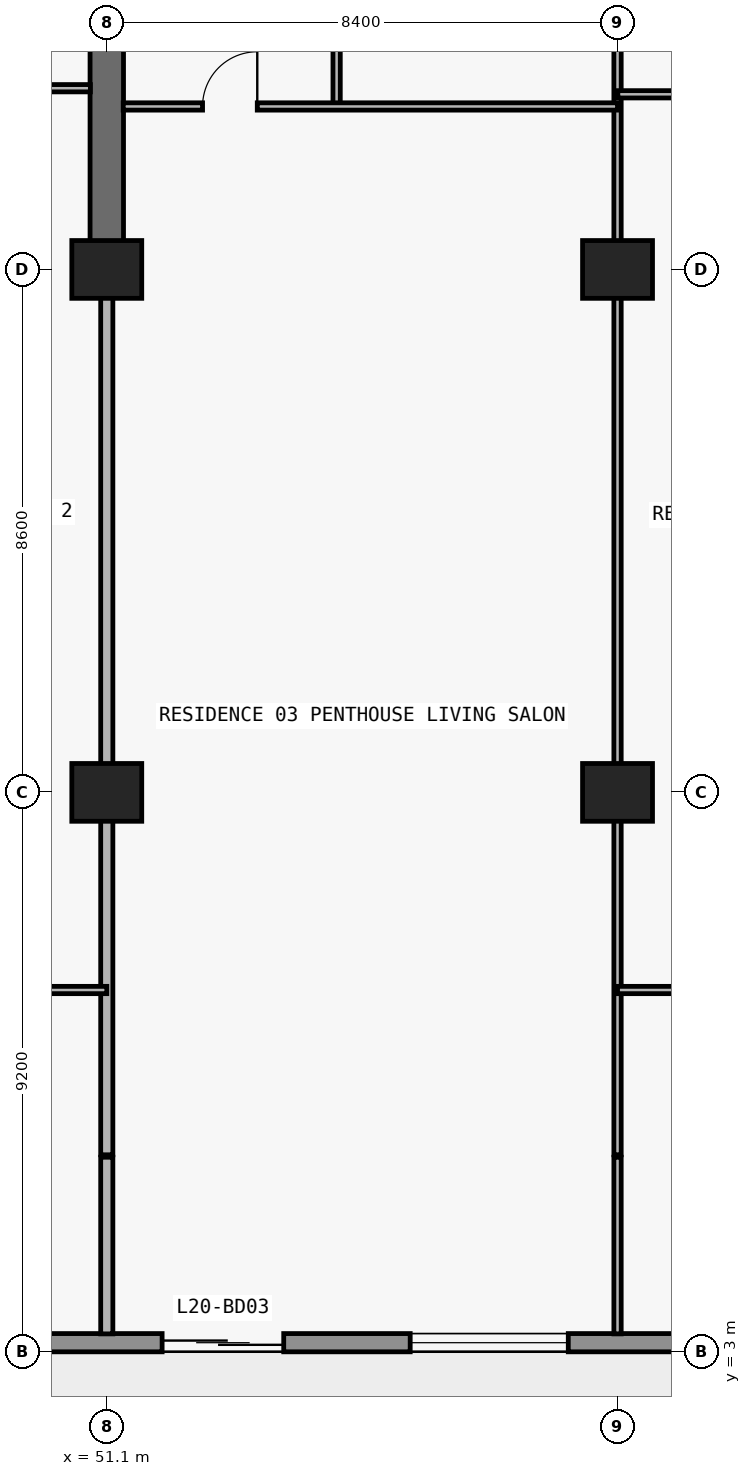
"""IFC4 building model, lengths in metres.
Left out: names, types, materials, properties, quantities, classifications, styles, units other than length and angle.
Written with IfcOpenShell. Run it as: python <this file> out.ifc"""

import sys

from ifc_helpers import new_model, si_unit, direction, frame, frame_2d, origin, origin_2d, place, context, subcontext, project, spatial, rectangle, extrude, element, fill, save


model = new_model("IFC4")
c1 = context("Model", 3, precision=1e-05, world=origin(), true_north=direction((0.0, 1.0)))
c2 = subcontext(c1, "Body", "Model", "MODEL_VIEW")
j1 = project(units=[si_unit("LENGTHUNIT", "METRE"), si_unit("PLANEANGLEUNIT", "RADIAN")], contexts=[c1])
p1 = place(None, origin())
s1 = spatial("IfcSite", under=j1, at=p1, CompositionType="ELEMENT")
p2 = place(p1, origin())
s2 = spatial("IfcBuilding", under=s1, at=p2, CompositionType="ELEMENT")
p3 = place(p2, frame((0.0, 0.0, 76.2)))
s3 = spatial("IfcBuildingStorey", under=s2, at=p3, CompositionType="ELEMENT", Elevation=76.2)
for number, where, z_axis, x_axis in (
    (1, (51.1, 12.2, 0.0), (0.0, 0.0, 1.0), (1.0, 0.0, 0.0)),
    (2, (59.5, 12.2, 0.0), (0.0, 0.0, 1.0), (1.0, 0.0, 0.0)),
    (3, (51.1, 20.8, 0.0), (0.0, 0.0, 1.0), (1.0, 0.0, 0.0)),
    (4, (59.5, 20.8, 0.0), (0.0, 0.0, 1.0), (1.0, 0.0, 0.0)),
):
    element("IfcColumn", number, at=place(p3, frame(where, z_axis=z_axis, x_axis=x_axis)), inside=s3, PredefinedType="COLUMN", context=c2, shape_type="SweptSolid", body=[
        extrude(rectangle(XDim=1.15, YDim=0.95, at=origin_2d()), origin(), (0.0, 0.0, 1.0), 3.0),
    ])
p4 = place(p3, frame((51.1, 20.8, 0.0), z_axis=(0.0, 0.0, 1.0), x_axis=(0.0, 1.0, 0.0)))
e5 = element("IfcWall", 5, at=p4, inside=s3, PredefinedType="SHEAR", context=c2, shape_type="SweptSolid", body=[
    extrude(rectangle(XDim=8.6, YDim=0.55, at=frame_2d((4.3, 0.0))), origin(), (0.0, 0.0, 1.0), 3.0),
])
p5 = place(p3, frame((72.7, 3.15, 0.0), z_axis=(0.0, 0.0, 1.0), x_axis=(-1.0, 0.0, 0.0)))
e6 = element("IfcWall", 6, at=p5, inside=s3, PredefinedType="STANDARD", context=c2, shape_type="SweptSolid", body=[
    extrude(rectangle(XDim=67.6, YDim=0.3, at=frame_2d((33.8, 0.0))), origin(), (0.0, 0.0, 1.0), 3.0),
])
p6 = place(p5, frame((59.89, 0.0, 0.0)))
e7 = element("IfcOpeningElement", 7, at=p6, cuts=e6, PredefinedType="OPENING", context=c2, shape_type="SweptSolid", body=[
    extrude(rectangle(XDim=2.0, YDim=2.3, at=frame_2d((1.0, 1.15))), frame((0.0, 0.16, 0.0), z_axis=(0.0, -1.0, 0.0), x_axis=(1.0, 0.0, 0.0)), (0.0, 0.0, 1.0), 0.32),
])
p7 = place(p5, frame((55.21, 0.0, 0.65)))
e8 = element("IfcOpeningElement", 8, at=p7, cuts=e6, PredefinedType="OPENING", context=c2, shape_type="SweptSolid", body=[
    extrude(rectangle(XDim=2.6, YDim=1.85, at=frame_2d((1.3, 0.925))), frame((0.0, 0.16, 0.0), z_axis=(0.0, -1.0, 0.0), x_axis=(1.0, 0.0, 0.0)), (0.0, 0.0, 1.0), 0.32),
])
p8 = place(p5, frame((49.1, 0.0, 0.85)))
e9 = element("IfcOpeningElement", 9, at=p8, cuts=e6, PredefinedType="OPENING", context=c2, shape_type="SweptSolid", body=[
    extrude(rectangle(XDim=2.2, YDim=1.55, at=frame_2d((1.1, 0.775))), frame((0.0, 0.16, 0.0), z_axis=(0.0, -1.0, 0.0), x_axis=(1.0, 0.0, 0.0)), (0.0, 0.0, 1.0), 0.32),
])
p9 = place(p5, frame((43.09, 0.0, 0.0)))
e10 = element("IfcOpeningElement", 10, at=p9, cuts=e6, PredefinedType="OPENING", context=c2, shape_type="SweptSolid", body=[
    extrude(rectangle(XDim=2.0, YDim=2.3, at=frame_2d((1.0, 1.15))), frame((0.0, 0.16, 0.0), z_axis=(0.0, -1.0, 0.0), x_axis=(1.0, 0.0, 0.0)), (0.0, 0.0, 1.0), 0.32),
])
p10 = place(p5, frame((38.41, 0.0, 0.65)))
e11 = element("IfcOpeningElement", 11, at=p10, cuts=e6, PredefinedType="OPENING", context=c2, shape_type="SweptSolid", body=[
    extrude(rectangle(XDim=2.6, YDim=1.85, at=frame_2d((1.3, 0.925))), frame((0.0, 0.16, 0.0), z_axis=(0.0, -1.0, 0.0), x_axis=(1.0, 0.0, 0.0)), (0.0, 0.0, 1.0), 0.32),
])
p11 = place(p5, frame((32.7, 0.0, 0.85)))
e12 = element("IfcOpeningElement", 12, at=p11, cuts=e6, PredefinedType="OPENING", context=c2, shape_type="SweptSolid", body=[
    extrude(rectangle(XDim=2.2, YDim=1.55, at=frame_2d((1.1, 0.775))), frame((0.0, 0.16, 0.0), z_axis=(0.0, -1.0, 0.0), x_axis=(1.0, 0.0, 0.0)), (0.0, 0.0, 1.0), 0.32),
])
p12 = place(p5, frame((24.7, 0.0, 0.85)))
e13 = element("IfcOpeningElement", 13, at=p12, cuts=e6, PredefinedType="OPENING", context=c2, shape_type="SweptSolid", body=[
    extrude(rectangle(XDim=2.2, YDim=1.55, at=frame_2d((1.1, 0.775))), frame((0.0, 0.16, 0.0), z_axis=(0.0, -1.0, 0.0), x_axis=(1.0, 0.0, 0.0)), (0.0, 0.0, 1.0), 0.32),
])
p13 = place(p5, frame((18.69, 0.0, 0.0)))
e14 = element("IfcOpeningElement", 14, at=p13, cuts=e6, PredefinedType="OPENING", context=c2, shape_type="SweptSolid", body=[
    extrude(rectangle(XDim=2.0, YDim=2.3, at=frame_2d((1.0, 1.15))), frame((0.0, 0.16, 0.0), z_axis=(0.0, -1.0, 0.0), x_axis=(1.0, 0.0, 0.0)), (0.0, 0.0, 1.0), 0.32),
])
p14 = place(p5, frame((14.01, 0.0, 0.65)))
e15 = element("IfcOpeningElement", 15, at=p14, cuts=e6, PredefinedType="OPENING", context=c2, shape_type="SweptSolid", body=[
    extrude(rectangle(XDim=2.6, YDim=1.85, at=frame_2d((1.3, 0.925))), frame((0.0, 0.16, 0.0), z_axis=(0.0, -1.0, 0.0), x_axis=(1.0, 0.0, 0.0)), (0.0, 0.0, 1.0), 0.32),
])
p15 = place(p5, frame((7.9, 0.0, 0.85)))
e16 = element("IfcOpeningElement", 16, at=p15, cuts=e6, PredefinedType="OPENING", context=c2, shape_type="SweptSolid", body=[
    extrude(rectangle(XDim=2.2, YDim=1.55, at=frame_2d((1.1, 0.775))), frame((0.0, 0.16, 0.0), z_axis=(0.0, -1.0, 0.0), x_axis=(1.0, 0.0, 0.0)), (0.0, 0.0, 1.0), 0.32),
])
p16 = place(p3, frame((51.1, 3.295, 0.0), z_axis=(0.0, 0.0, 1.0), x_axis=(0.0, 1.0, 0.0)))
e17 = element("IfcWall", 17, at=p16, inside=s3, PredefinedType="PARTITIONING", context=c2, shape_type="SweptSolid", body=[
    extrude(rectangle(XDim=2.905, YDim=0.2, at=frame_2d((1.453, 0.0))), origin(), (0.0, 0.0, 1.0), 3.0),
])
p17 = place(p3, frame((51.1, 6.24, 0.0), z_axis=(0.0, 0.0, 1.0), x_axis=(0.0, 1.0, 0.0)))
e18 = element("IfcWall", 18, at=p17, inside=s3, PredefinedType="PARTITIONING", context=c2, shape_type="SweptSolid", body=[
    extrude(rectangle(XDim=14.555, YDim=0.2, at=frame_2d((7.277, 0.0))), origin(), (0.0, 0.0, 1.0), 2.06),
])
p18 = place(p3, frame((54.88, 23.48, 0.0), z_axis=(0.0, 0.0, 1.0), x_axis=(0.0, 1.0, 0.0)))
e19 = element("IfcWall", 19, at=p18, inside=s3, PredefinedType="PARTITIONING", context=c2, shape_type="SweptSolid", body=[
    extrude(rectangle(XDim=4.8, YDim=0.12, at=frame_2d((2.4, 0.0))), origin(), (0.0, 0.0, 1.0), 3.0),
])
p19 = place(p18, frame((1.95, 0.0, 0.0)))
e20 = element("IfcOpeningElement", 20, at=p19, cuts=e19, PredefinedType="OPENING", context=c2, shape_type="SweptSolid", body=[
    extrude(rectangle(XDim=0.9, YDim=2.15, at=frame_2d((0.45, 1.075))), frame((0.0, 0.07, 0.0), z_axis=(0.0, -1.0, 0.0), x_axis=(1.0, 0.0, 0.0)), (0.0, 0.0, 1.0), 0.14),
])
p20 = place(p3, frame((59.5, 3.295, 0.0), z_axis=(0.0, 0.0, 1.0), x_axis=(0.0, 1.0, 0.0)))
e21 = element("IfcWall", 21, at=p20, inside=s3, PredefinedType="PARTITIONING", context=c2, shape_type="SweptSolid", body=[
    extrude(rectangle(XDim=2.905, YDim=0.12, at=frame_2d((1.453, 0.0))), origin(), (0.0, 0.0, 1.0), 3.0),
])
p21 = place(p3, frame((59.5, 6.24, 0.0), z_axis=(0.0, 0.0, 1.0), x_axis=(0.0, 1.0, 0.0)))
e22 = element("IfcWall", 22, at=p21, inside=s3, PredefinedType="PARTITIONING", context=c2, shape_type="SweptSolid", body=[
    extrude(rectangle(XDim=27.96, YDim=0.12, at=frame_2d((13.98, 0.0))), origin(), (0.0, 0.0, 1.0), 2.06),
])
p22 = place(p21, frame((19.19, 0.0, 0.0)))
e23 = element("IfcOpeningElement", 23, at=p22, cuts=e22, PredefinedType="OPENING", context=c2, shape_type="SweptSolid", body=[
    extrude(rectangle(XDim=0.9, YDim=2.01, at=frame_2d((0.45, 1.005))), frame((0.0, 0.07, 0.0), z_axis=(0.0, -1.0, 0.0), x_axis=(1.0, 0.0, 0.0)), (0.0, 0.0, 1.0), 0.14),
])
p23 = place(p3, frame((35.1, 8.95, 0.0), z_axis=(0.0, 0.0, 1.0), x_axis=(1.0, 0.0, 0.0)))
e24 = element("IfcWall", 24, at=p23, inside=s3, PredefinedType="PARTITIONING", context=c2, shape_type="SweptSolid", body=[
    extrude(rectangle(XDim=16.0, YDim=0.12, at=frame_2d((8.0, 0.0))), origin(), (0.0, 0.0, 1.0), 3.0),
])
p24 = place(p23, frame((3.35, 0.0, 0.0)))
e25 = element("IfcOpeningElement", 25, at=p24, cuts=e24, PredefinedType="OPENING", context=c2, shape_type="SweptSolid", body=[
    extrude(rectangle(XDim=0.9, YDim=2.15, at=frame_2d((0.45, 1.075))), frame((0.0, 0.07, 0.0), z_axis=(0.0, -1.0, 0.0), x_axis=(1.0, 0.0, 0.0)), (0.0, 0.0, 1.0), 0.14),
])
p25 = place(p23, frame((11.35, 0.0, 0.0)))
e26 = element("IfcOpeningElement", 26, at=p25, cuts=e24, PredefinedType="OPENING", context=c2, shape_type="SweptSolid", body=[
    extrude(rectangle(XDim=0.9, YDim=2.15, at=frame_2d((0.45, 1.075))), frame((0.0, 0.07, 0.0), z_axis=(0.0, -1.0, 0.0), x_axis=(1.0, 0.0, 0.0)), (0.0, 0.0, 1.0), 0.14),
])
p26 = place(p3, frame((59.5, 8.95, 0.0), z_axis=(0.0, 0.0, 1.0), x_axis=(1.0, 0.0, 0.0)))
e27 = element("IfcWall", 27, at=p26, inside=s3, PredefinedType="PARTITIONING", context=c2, shape_type="SweptSolid", body=[
    extrude(rectangle(XDim=8.4, YDim=0.12, at=frame_2d((4.2, 0.0))), origin(), (0.0, 0.0, 1.0), 3.0),
])
p27 = place(p26, frame((3.75, 0.0, 0.0)))
e28 = element("IfcOpeningElement", 28, at=p27, cuts=e27, PredefinedType="OPENING", context=c2, shape_type="SweptSolid", body=[
    extrude(rectangle(XDim=0.9, YDim=2.15, at=frame_2d((0.45, 1.075))), frame((0.0, 0.07, 0.0), z_axis=(0.0, -1.0, 0.0), x_axis=(1.0, 0.0, 0.0)), (0.0, 0.0, 1.0), 0.14),
])
p28 = place(p3, frame((51.37, 23.48, 0.0), z_axis=(0.0, 0.0, 1.0), x_axis=(1.0, 0.0, 0.0)))
e29 = element("IfcWall", 29, at=p28, inside=s3, PredefinedType="PARTITIONING", context=c2, shape_type="SweptSolid", body=[
    extrude(rectangle(XDim=8.13, YDim=0.12, at=frame_2d((4.065, 0.0))), origin(), (0.0, 0.0, 1.0), 3.0),
])
p29 = place(p28, frame((1.305, 0.0, 0.0)))
e30 = element("IfcOpeningElement", 30, at=p29, cuts=e29, PredefinedType="OPENING", context=c2, shape_type="SweptSolid", body=[
    extrude(rectangle(XDim=0.9, YDim=2.15, at=frame_2d((0.45, 1.075))), frame((0.0, 0.07, 0.0), z_axis=(0.0, -1.0, 0.0), x_axis=(1.0, 0.0, 0.0)), (0.0, 0.0, 1.0), 0.14),
])
p30 = place(p3, frame((59.505, 23.68, 0.0), z_axis=(0.0, 0.0, 1.0), x_axis=(1.0, 0.0, 0.0)))
e31 = element("IfcWall", 31, at=p30, inside=s3, PredefinedType="PARTITIONING", context=c2, shape_type="SweptSolid", body=[
    extrude(rectangle(XDim=8.395, YDim=0.12, at=frame_2d((4.198, 0.0))), origin(), (0.0, 0.0, 1.0), 3.0),
])
p31 = place(p30, frame((3.748, 0.0, 0.0)))
e32 = element("IfcOpeningElement", 32, at=p31, cuts=e31, PredefinedType="OPENING", context=c2, shape_type="SweptSolid", body=[
    extrude(rectangle(XDim=0.9, YDim=2.15, at=frame_2d((0.45, 1.075))), frame((0.0, 0.07, 0.0), z_axis=(0.0, -1.0, 0.0), x_axis=(1.0, 0.0, 0.0)), (0.0, 0.0, 1.0), 0.14),
])
p32 = place(p3, frame((42.7, 23.78, 0.0), z_axis=(0.0, 0.0, 1.0), x_axis=(1.0, 0.0, 0.0)))
e33 = element("IfcWall", 33, at=p32, inside=s3, PredefinedType="PARTITIONING", context=c2, shape_type="SweptSolid", body=[
    extrude(rectangle(XDim=8.13, YDim=0.12, at=frame_2d((4.065, 0.0))), origin(), (0.0, 0.0, 1.0), 3.0),
])
p33 = place(p32, frame((3.615, 0.0, 0.0)))
e34 = element("IfcOpeningElement", 34, at=p33, cuts=e33, PredefinedType="OPENING", context=c2, shape_type="SweptSolid", body=[
    extrude(rectangle(XDim=0.9, YDim=2.15, at=frame_2d((0.45, 1.075))), frame((0.0, 0.07, 0.0), z_axis=(0.0, -1.0, 0.0), x_axis=(1.0, 0.0, 0.0)), (0.0, 0.0, 1.0), 0.14),
])
p34 = place(p13, origin())
e35 = element("IfcDoor", 35, at=p34, inside=s3, OperationType="DOUBLE_DOOR_SLIDING", PredefinedType="DOOR", context=c2, shape_type="SweptSolid", body=[
    extrude(rectangle(XDim=2.0, YDim=2.3, at=frame_2d((1.0, 1.15))), frame((0.0, 0.025, 0.0), z_axis=(0.0, -1.0, 0.0), x_axis=(1.0, 0.0, 0.0)), (0.0, 0.0, 1.0), 0.05),
])
fill(e14, e35)
p35 = place(p14, origin())
e36 = element("IfcWindow", 36, at=p35, inside=s3, PartitioningType="SINGLE_PANEL", PredefinedType="WINDOW", context=c2, shape_type="SweptSolid", body=[
    extrude(rectangle(XDim=2.6, YDim=1.85, at=frame_2d((1.3, 0.925))), frame((0.0, 0.03, 0.0), z_axis=(0.0, -1.0, 0.0), x_axis=(1.0, 0.0, 0.0)), (0.0, 0.0, 1.0), 0.06),
])
fill(e15, e36)
p36 = place(p29, origin())
e37 = element("IfcDoor", 37, at=p36, inside=s3, OperationType="SINGLE_SWING_RIGHT", PredefinedType="DOOR", context=c2, shape_type="SweptSolid", body=[
    extrude(rectangle(XDim=0.9, YDim=2.15, at=frame_2d((0.45, 1.075))), frame((0.0, 0.025, 0.0), z_axis=(0.0, -1.0, 0.0), x_axis=(1.0, 0.0, 0.0)), (0.0, 0.0, 1.0), 0.05),
])
fill(e30, e37)
save(model, sys.argv[1])
